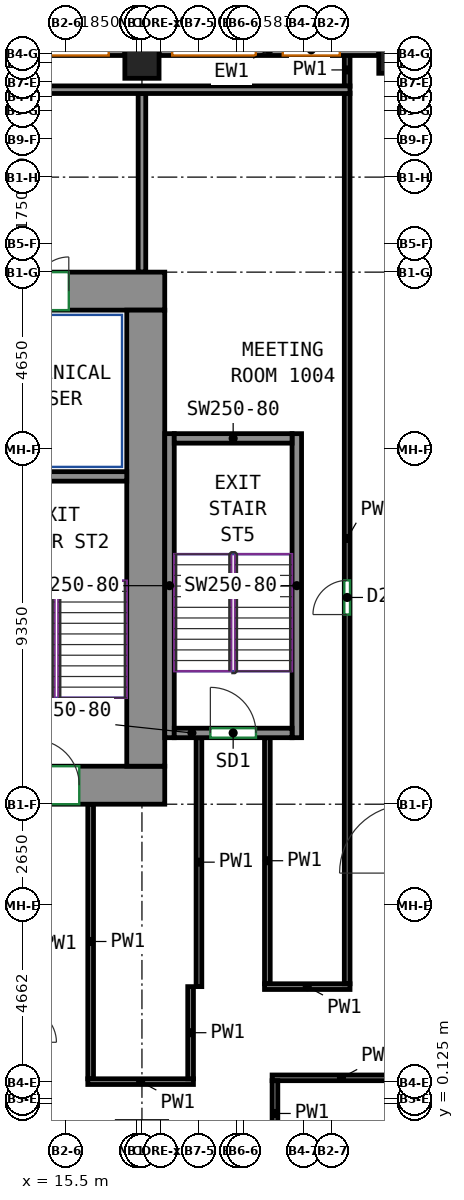
"""IFC4 building model, lengths in metres.
Left out: names, types, materials, properties, quantities, classifications, styles, units other than length and angle.
Written with IfcOpenShell. Run it as: python <this file> out.ifc"""

import sys

from ifc_helpers import new_model, si_unit, direction, frame, frame_2d, origin, origin_2d, place, context, subcontext, project, spatial, rectangle, extrude, source, transform, mapped, element, fill, save


model = new_model("IFC4")
c1 = context("Model", 3, precision=1e-05, world=origin(), true_north=direction((0.0, 1.0)))
c2 = subcontext(c1, "Body", "Model", "MODEL_VIEW")
j1 = project(units=[si_unit("LENGTHUNIT", "METRE"), si_unit("PLANEANGLEUNIT", "RADIAN")], contexts=[c1])
p1 = place(None, origin())
s1 = spatial("IfcSite", under=j1, at=p1, CompositionType="ELEMENT")
p2 = place(p1, origin())
s2 = spatial("IfcBuilding", under=s1, at=p2, CompositionType="ELEMENT")
p3 = place(p2, frame((0.0, 0.0, 47.0)))
s3 = spatial("IfcBuildingStorey", under=s2, at=p3, CompositionType="ELEMENT", Elevation=47.0)
m1 = source(origin(), c2, "Body", "SweptSolid", [
    extrude(rectangle(XDim=0.9, YDim=0.9, at=origin_2d()), origin(), (0.0, 0.0, 1.0), 3.72),
])
for number, where, z_axis, x_axis in (
    (1, (17.5, 27.55, 0.0), (0.0, 0.0, 1.0), (1.0, 0.0, 0.0)),
    (2, (24.182, 27.682, 0.0), (0.0, 0.0, 1.0), (1.0, 0.0, 0.0)),
):
    element("IfcColumn", number, at=place(p3, frame(where, z_axis=z_axis, x_axis=x_axis)), inside=s3, PredefinedType="COLUMN", context=c2, shape_type="MappedRepresentation", body=[
        mapped(m1, transform((0.0, 0.0, 0.0))),
    ])
m2 = source(origin(), c2, "Body", "SweptSolid", [
    extrude(rectangle(XDim=5.63, YDim=1.0, at=frame_2d((2.815, 0.0))), origin(), (0.0, 0.0, 1.0), 3.72),
])
p4 = place(p3, frame((12.47, 8.5, 0.0), z_axis=(0.0, 0.0, 1.0), x_axis=(1.0, 0.0, 0.0)))
e3 = element("IfcWall", 3, at=p4, inside=s3, PredefinedType="SHEAR", context=c2, shape_type="MappedRepresentation", body=[
    mapped(m2, transform((0.0, 0.0, 0.0))),
])
p5 = place(p4, frame((2.18, 0.0, 0.0)))
e4 = element("IfcOpeningElement", 4, at=p5, cuts=e3, PredefinedType="OPENING", context=c2, shape_type="SweptSolid", body=[
    extrude(rectangle(XDim=1.2, YDim=2.1, at=frame_2d((0.6, 1.05))), frame((0.0, 0.51, 0.0), z_axis=(0.0, -1.0, 0.0), x_axis=(1.0, 0.0, 0.0)), (0.0, 0.0, 1.0), 1.02),
])
m3 = source(origin(), c2, "Body", "SweptSolid", [
    extrude(rectangle(XDim=34.1, YDim=1.0, at=frame_2d((17.05, 0.0))), origin(), (0.0, 0.0, 1.0), 3.72),
])
p6 = place(p3, frame((-16.0, 21.5, 0.0), z_axis=(0.0, 0.0, 1.0), x_axis=(1.0, 0.0, 0.0)))
e5 = element("IfcWall", 5, at=p6, inside=s3, PredefinedType="SHEAR", context=c2, shape_type="MappedRepresentation", body=[
    mapped(m3, transform((0.0, 0.0, 0.0))),
])
p7 = place(p6, frame((6.831, 0.0, 0.0)))
e6 = element("IfcOpeningElement", 6, at=p7, cuts=e5, PredefinedType="OPENING", context=c2, shape_type="SweptSolid", body=[
    extrude(rectangle(XDim=0.9, YDim=2.1, at=frame_2d((0.45, 1.05))), frame((0.0, 0.51, 0.0), z_axis=(0.0, -1.0, 0.0), x_axis=(1.0, 0.0, 0.0)), (0.0, 0.0, 1.0), 1.02),
])
p8 = place(p6, frame((12.138, 0.0, 0.0)))
e7 = element("IfcOpeningElement", 7, at=p8, cuts=e5, PredefinedType="OPENING", context=c2, shape_type="SweptSolid", body=[
    extrude(rectangle(XDim=0.9, YDim=2.1, at=frame_2d((0.45, 1.05))), frame((0.0, 0.51, 0.0), z_axis=(0.0, -1.0, 0.0), x_axis=(1.0, 0.0, 0.0)), (0.0, 0.0, 1.0), 1.02),
])
p9 = place(p6, frame((17.565, 0.0, 0.0)))
e8 = element("IfcOpeningElement", 8, at=p9, cuts=e5, PredefinedType="OPENING", context=c2, shape_type="SweptSolid", body=[
    extrude(rectangle(XDim=0.9, YDim=2.1, at=frame_2d((0.45, 1.05))), frame((0.0, 0.51, 0.0), z_axis=(0.0, -1.0, 0.0), x_axis=(1.0, 0.0, 0.0)), (0.0, 0.0, 1.0), 1.02),
])
p10 = place(p6, frame((21.786, 0.0, 0.0)))
e9 = element("IfcOpeningElement", 9, at=p10, cuts=e5, PredefinedType="OPENING", context=c2, shape_type="SweptSolid", body=[
    extrude(rectangle(XDim=0.9, YDim=2.1, at=frame_2d((0.45, 1.05))), frame((0.0, 0.51, 0.0), z_axis=(0.0, -1.0, 0.0), x_axis=(1.0, 0.0, 0.0)), (0.0, 0.0, 1.0), 1.02),
])
p11 = place(p6, frame((26.127, 0.0, 0.0)))
e10 = element("IfcOpeningElement", 10, at=p11, cuts=e5, PredefinedType="OPENING", context=c2, shape_type="SweptSolid", body=[
    extrude(rectangle(XDim=0.9, YDim=2.1, at=frame_2d((0.45, 1.05))), frame((0.0, 0.51, 0.0), z_axis=(0.0, -1.0, 0.0), x_axis=(1.0, 0.0, 0.0)), (0.0, 0.0, 1.0), 1.02),
])
p12 = place(p6, frame((2.525, 0.0, 0.0)))
e11 = element("IfcOpeningElement", 11, at=p12, cuts=e5, PredefinedType="OPENING", context=c2, shape_type="SweptSolid", body=[
    extrude(rectangle(XDim=0.9, YDim=2.1, at=frame_2d((0.45, 1.05))), frame((0.0, 0.51, 0.0), z_axis=(0.0, -1.0, 0.0), x_axis=(1.0, 0.0, 0.0)), (0.0, 0.0, 1.0), 1.02),
])
p13 = place(p6, frame((30.675, 0.0, 0.0)))
e12 = element("IfcOpeningElement", 12, at=p13, cuts=e5, PredefinedType="OPENING", context=c2, shape_type="SweptSolid", body=[
    extrude(rectangle(XDim=0.9, YDim=2.1, at=frame_2d((0.45, 1.05))), frame((0.0, 0.51, 0.0), z_axis=(0.0, -1.0, 0.0), x_axis=(1.0, 0.0, 0.0)), (0.0, 0.0, 1.0), 1.02),
])
m4 = source(origin(), c2, "Body", "SweptSolid", [
    extrude(rectangle(XDim=12.0, YDim=1.0, at=frame_2d((6.0, 0.0))), origin(), (0.0, 0.0, 1.0), 3.72),
])
p14 = place(p3, frame((17.6, 9.0, 0.0), z_axis=(0.0, 0.0, 1.0), x_axis=(0.0, 1.0, 0.0)))
e13 = element("IfcWall", 13, at=p14, inside=s3, PredefinedType="SHEAR", context=c2, shape_type="MappedRepresentation", body=[
    mapped(m4, transform((0.0, 0.0, 0.0))),
])
m5 = source(origin(), c2, "Body", "SweptSolid", [
    extrude(rectangle(XDim=3.7, YDim=0.25, at=frame_2d((1.85, 0.0))), origin(), (0.0, 0.0, 1.0), 3.72),
])
p15 = place(p3, frame((13.4, 16.625, 0.0), z_axis=(0.0, 0.0, 1.0), x_axis=(1.0, 0.0, 0.0)))
e14 = element("IfcWall", 14, at=p15, inside=s3, PredefinedType="SHEAR", context=c2, shape_type="MappedRepresentation", body=[
    mapped(m5, transform((0.0, 0.0, 0.0))),
])
m6 = source(origin(), c2, "Body", "SweptSolid", [
    extrude(rectangle(XDim=8.0, YDim=0.25, at=frame_2d((4.0, 0.0))), origin(), (0.0, 0.0, 1.0), 3.72),
])
for number, where, z_axis, x_axis in (
    (15, (18.225, 9.75, 0.0), (0.0, 0.0, 1.0), (0.0, 1.0, 0.0)),
    (16, (21.575, 9.75, 0.0), (0.0, 0.0, 1.0), (0.0, 1.0, 0.0)),
):
    element("IfcWall", number, at=place(p3, frame(where, z_axis=z_axis, x_axis=x_axis)), inside=s3, PredefinedType="SHEAR", context=c2, shape_type="MappedRepresentation", body=[
        mapped(m6, transform((0.0, 0.0, 0.0))),
    ])
m7 = source(origin(), c2, "Body", "SweptSolid", [
    extrude(rectangle(XDim=3.1, YDim=0.25, at=frame_2d((1.55, 0.0))), origin(), (0.0, 0.0, 1.0), 3.72),
])
p16 = place(p3, frame((18.35, 9.875, 0.0), z_axis=(0.0, 0.0, 1.0), x_axis=(1.0, 0.0, 0.0)))
e17 = element("IfcWall", 17, at=p16, inside=s3, PredefinedType="SHEAR", context=c2, shape_type="MappedRepresentation", body=[
    mapped(m7, transform((0.0, 0.0, 0.0))),
])
p17 = place(p16, frame((0.95, 0.0, 0.0)))
e18 = element("IfcOpeningElement", 18, at=p17, cuts=e17, PredefinedType="OPENING", context=c2, shape_type="SweptSolid", body=[
    extrude(rectangle(XDim=1.2, YDim=2.1, at=frame_2d((0.6, 1.05))), frame((0.0, 0.135, 0.0), z_axis=(0.0, -1.0, 0.0), x_axis=(1.0, 0.0, 0.0)), (0.0, 0.0, 1.0), 0.27),
])
p18 = place(p3, frame((18.35, 17.625, 0.0), z_axis=(0.0, 0.0, 1.0), x_axis=(1.0, 0.0, 0.0)))
e19 = element("IfcWall", 19, at=p18, inside=s3, PredefinedType="SHEAR", context=c2, shape_type="MappedRepresentation", body=[
    mapped(m7, transform((0.0, 0.0, 0.0))),
])
m8 = source(origin(), c2, "Body", "SweptSolid", [
    extrude(rectangle(XDim=5.782, YDim=0.3, at=frame_2d((2.891, 0.0))), origin(), (0.0, 0.0, 1.0), 3.72),
])
p19 = place(p3, frame((23.732, 27.85, 0.0), z_axis=(0.0, 0.0, 1.0), x_axis=(-1.0, 0.0, 0.0)))
e20 = element("IfcWall", 20, at=p19, inside=s3, PredefinedType="SOLIDWALL", context=c2, shape_type="MappedRepresentation", body=[
    mapped(m8, transform((0.0, 0.0, 0.0))),
])
p20 = place(p19, frame((1.026, 0.0, 0.7)))
e21 = element("IfcOpeningElement", 21, at=p20, cuts=e20, PredefinedType="OPENING", context=c2, shape_type="SweptSolid", body=[
    extrude(rectangle(XDim=1.5, YDim=2.25, at=frame_2d((0.75, 1.125))), frame((0.0, 0.16, 0.0), z_axis=(0.0, -1.0, 0.0), x_axis=(1.0, 0.0, 0.0)), (0.0, 0.0, 1.0), 0.32),
])
p21 = place(p19, frame((3.236, 0.0, 0.7)))
e22 = element("IfcOpeningElement", 22, at=p21, cuts=e20, PredefinedType="OPENING", context=c2, shape_type="SweptSolid", body=[
    extrude(rectangle(XDim=2.2, YDim=2.25, at=frame_2d((1.1, 1.125))), frame((0.0, 0.16, 0.0), z_axis=(0.0, -1.0, 0.0), x_axis=(1.0, 0.0, 0.0)), (0.0, 0.0, 1.0), 0.32),
])
m9 = source(origin(), c2, "Body", "SweptSolid", [
    extrude(rectangle(XDim=6.1, YDim=0.3, at=frame_2d((3.05, 0.0))), origin(), (0.0, 0.0, 1.0), 3.72),
])
p22 = place(p3, frame((17.05, 27.85, 0.0), z_axis=(0.0, 0.0, 1.0), x_axis=(-1.0, 0.0, 0.0)))
e23 = element("IfcWall", 23, at=p22, inside=s3, PredefinedType="SOLIDWALL", context=c2, shape_type="MappedRepresentation", body=[
    mapped(m9, transform((0.0, 0.0, 0.0))),
])
p23 = place(p22, frame((0.425, 0.0, 0.7)))
e24 = element("IfcOpeningElement", 24, at=p23, cuts=e23, PredefinedType="OPENING", context=c2, shape_type="SweptSolid", body=[
    extrude(rectangle(XDim=2.2, YDim=2.25, at=frame_2d((1.1, 1.125))), frame((0.0, 0.16, 0.0), z_axis=(0.0, -1.0, 0.0), x_axis=(1.0, 0.0, 0.0)), (0.0, 0.0, 1.0), 0.32),
])
p24 = place(p22, frame((3.475, 0.0, 0.7)))
e25 = element("IfcOpeningElement", 25, at=p24, cuts=e23, PredefinedType="OPENING", context=c2, shape_type="SweptSolid", body=[
    extrude(rectangle(XDim=2.2, YDim=2.25, at=frame_2d((1.1, 1.125))), frame((0.0, 0.16, 0.0), z_axis=(0.0, -1.0, 0.0), x_axis=(1.0, 0.0, 0.0)), (0.0, 0.0, 1.0), 0.32),
])
p25 = place(p3, frame((16.15, 0.775, 0.0), z_axis=(0.0, 0.0, 1.0), x_axis=(0.0, 1.0, 0.0)))
e26 = element("IfcWall", 26, at=p25, inside=s3, PredefinedType="PARTITIONING", context=c2, shape_type="SweptSolid", body=[
    extrude(rectangle(XDim=7.225, YDim=0.15, at=frame_2d((3.613, 0.0))), origin(), (0.0, 0.0, 1.0), 3.72),
])
p26 = place(p3, frame((16.075, 0.7, 0.0), z_axis=(0.0, 0.0, 1.0), x_axis=(1.0, 0.0, 0.0)))
e27 = element("IfcWall", 27, at=p26, inside=s3, PredefinedType="PARTITIONING", context=c2, shape_type="SweptSolid", body=[
    extrude(rectangle(XDim=2.78, YDim=0.15, at=frame_2d((1.39, 0.0))), origin(), (0.0, 0.0, 1.0), 3.72),
])
p27 = place(p3, frame((18.78, 3.2, 0.0), z_axis=(0.0, 0.0, 1.0), x_axis=(0.0, -1.0, 0.0)))
e28 = element("IfcWall", 28, at=p27, inside=s3, PredefinedType="PARTITIONING", context=c2, shape_type="SweptSolid", body=[
    extrude(rectangle(XDim=2.425, YDim=0.15, at=frame_2d((1.212, 0.0))), origin(), (0.0, 0.0, 1.0), 3.72),
])
p28 = place(p3, frame((19.0, 9.75, 0.0), z_axis=(0.0, 0.0, 1.0), x_axis=(0.0, -1.0, 0.0)))
e29 = element("IfcWall", 29, at=p28, inside=s3, PredefinedType="PARTITIONING", context=c2, shape_type="SweptSolid", body=[
    extrude(rectangle(XDim=6.55, YDim=0.15, at=frame_2d((3.275, 0.0))), origin(), (0.0, 0.0, 1.0), 3.72),
])
p29 = place(p3, frame((20.8, 3.275, 0.0), z_axis=(0.0, 0.0, 1.0), x_axis=(0.0, 1.0, 0.0)))
e30 = element("IfcWall", 30, at=p29, inside=s3, PredefinedType="PARTITIONING", context=c2, shape_type="SweptSolid", body=[
    extrude(rectangle(XDim=6.475, YDim=0.15, at=frame_2d((3.238, 0.0))), origin(), (0.0, 0.0, 1.0), 3.72),
])
p30 = place(p3, frame((20.725, 3.2, 0.0), z_axis=(0.0, 0.0, 1.0), x_axis=(1.0, 0.0, 0.0)))
e31 = element("IfcWall", 31, at=p30, inside=s3, PredefinedType="PARTITIONING", context=c2, shape_type="SweptSolid", body=[
    extrude(rectangle(XDim=2.25, YDim=0.15, at=frame_2d((1.125, 0.0))), origin(), (0.0, 0.0, 1.0), 3.72),
])
p31 = place(p3, frame((22.9, 3.275, 0.0), z_axis=(0.0, 0.0, 1.0), x_axis=(0.0, 1.0, 0.0)))
e32 = element("IfcWall", 32, at=p31, inside=s3, PredefinedType="PARTITIONING", context=c2, shape_type="SweptSolid", body=[
    extrude(rectangle(XDim=23.435, YDim=0.15, at=frame_2d((11.718, 0.0))), origin(), (0.0, 0.0, 1.0), 3.72),
])
p32 = place(p31, frame((9.715, 0.0, 0.0)))
e33 = element("IfcOpeningElement", 33, at=p32, cuts=e32, PredefinedType="OPENING", context=c2, shape_type="SweptSolid", body=[
    extrude(rectangle(XDim=0.9, YDim=2.1, at=frame_2d((0.45, 1.05))), frame((0.0, 0.085, 0.0), z_axis=(0.0, -1.0, 0.0), x_axis=(1.0, 0.0, 0.0)), (0.0, 0.0, 1.0), 0.17),
])
p33 = place(p3, frame((20.925, 0.8, 0.0), z_axis=(0.0, 0.0, 1.0), x_axis=(1.0, 0.0, 0.0)))
e34 = element("IfcWall", 34, at=p33, inside=s3, PredefinedType="PARTITIONING", context=c2, shape_type="SweptSolid", body=[
    extrude(rectangle(XDim=3.65, YDim=0.15, at=frame_2d((1.825, 0.0))), origin(), (0.0, 0.0, 1.0), 3.72),
])
p34 = place(p3, frame((21.0, -1.0, 0.0), z_axis=(0.0, 0.0, 1.0), x_axis=(0.0, 1.0, 0.0)))
e35 = element("IfcWall", 35, at=p34, inside=s3, PredefinedType="PARTITIONING", context=c2, shape_type="SweptSolid", body=[
    extrude(rectangle(XDim=1.725, YDim=0.15, at=frame_2d((0.863, 0.0))), origin(), (0.0, 0.0, 1.0), 3.72),
])
p35 = place(p3, frame((22.9, 26.891, 0.0), z_axis=(0.0, 0.0, 1.0), x_axis=(0.0, 1.0, 0.0)))
e36 = element("IfcWall", 36, at=p35, inside=s3, PredefinedType="PARTITIONING", context=c2, shape_type="SweptSolid", body=[
    extrude(rectangle(XDim=0.859, YDim=0.15, at=frame_2d((0.429, 0.0))), origin(), (0.0, 0.0, 1.0), 3.72),
])
p36 = place(p3, frame((17.5, 22.0, 0.0), z_axis=(0.0, 0.0, 1.0), x_axis=(0.0, 1.0, 0.0)))
e37 = element("IfcWall", 37, at=p36, inside=s3, PredefinedType="PARTITIONING", context=c2, shape_type="SweptSolid", body=[
    extrude(rectangle(XDim=4.7, YDim=0.2, at=frame_2d((2.35, 0.0))), origin(), (0.0, 0.0, 1.0), 3.72),
])
p37 = place(p3, frame((-20.874, 26.8, 0.0), z_axis=(0.0, 0.0, 1.0), x_axis=(1.0, 0.0, 0.0)))
e38 = element("IfcWall", 38, at=p37, inside=s3, PredefinedType="PARTITIONING", context=c2, shape_type="SweptSolid", body=[
    extrude(rectangle(XDim=43.848, YDim=0.2, at=frame_2d((21.924, 0.0))), origin(), (0.0, 0.0, 1.0), 3.72),
])
p38 = place(p37, frame((33.867, 0.0, 0.0)))
e39 = element("IfcOpeningElement", 39, at=p38, cuts=e38, PredefinedType="OPENING", context=c2, shape_type="SweptSolid", body=[
    extrude(rectangle(XDim=1.0, YDim=2.1, at=frame_2d((0.5, 1.05))), frame((0.0, 0.11, 0.0), z_axis=(0.0, -1.0, 0.0), x_axis=(1.0, 0.0, 0.0)), (0.0, 0.0, 1.0), 0.22),
])
p39 = place(p13, origin())
e40 = element("IfcDoor", 40, at=p39, inside=s3, OperationType="SINGLE_SWING_RIGHT", PredefinedType="DOOR", context=c2, shape_type="SweptSolid", body=[
    extrude(rectangle(XDim=0.9, YDim=2.1, at=frame_2d((0.45, 1.05))), frame((0.0, -0.355, 0.0), z_axis=(0.0, -1.0, 0.0), x_axis=(1.0, 0.0, 0.0)), (0.0, 0.0, 1.0), 0.05),
])
fill(e12, e40)
p40 = place(p5, origin())
e41 = element("IfcDoor", 41, at=p40, inside=s3, OperationType="DOUBLE_DOOR_SINGLE_SWING", PredefinedType="DOOR", context=c2, shape_type="SweptSolid", body=[
    extrude(rectangle(XDim=1.2, YDim=2.1, at=frame_2d((0.6, 1.05))), frame((0.0, 0.405, 0.0), z_axis=(0.0, -1.0, 0.0), x_axis=(1.0, 0.0, 0.0)), (0.0, 0.0, 1.0), 0.05),
])
fill(e4, e41)
p41 = place(p17, origin())
e42 = element("IfcDoor", 42, at=p41, inside=s3, OperationType="DOUBLE_DOOR_SINGLE_SWING", PredefinedType="DOOR", context=c2, shape_type="SweptSolid", body=[
    extrude(rectangle(XDim=1.2, YDim=2.1, at=frame_2d((0.6, 1.05))), frame((0.0, 0.025, 0.0), z_axis=(0.0, -1.0, 0.0), x_axis=(1.0, 0.0, 0.0)), (0.0, 0.0, 1.0), 0.05),
])
fill(e18, e42)
p42 = place(p32, origin())
e43 = element("IfcDoor", 43, at=p42, inside=s3, OperationType="SINGLE_SWING_LEFT", PredefinedType="DOOR", context=c2, shape_type="SweptSolid", body=[
    extrude(rectangle(XDim=0.9, YDim=2.1, at=frame_2d((0.45, 1.05))), frame((0.0, 0.025, 0.0), z_axis=(0.0, -1.0, 0.0), x_axis=(1.0, 0.0, 0.0)), (0.0, 0.0, 1.0), 0.05),
])
fill(e33, e43)
save(model, sys.argv[1])
